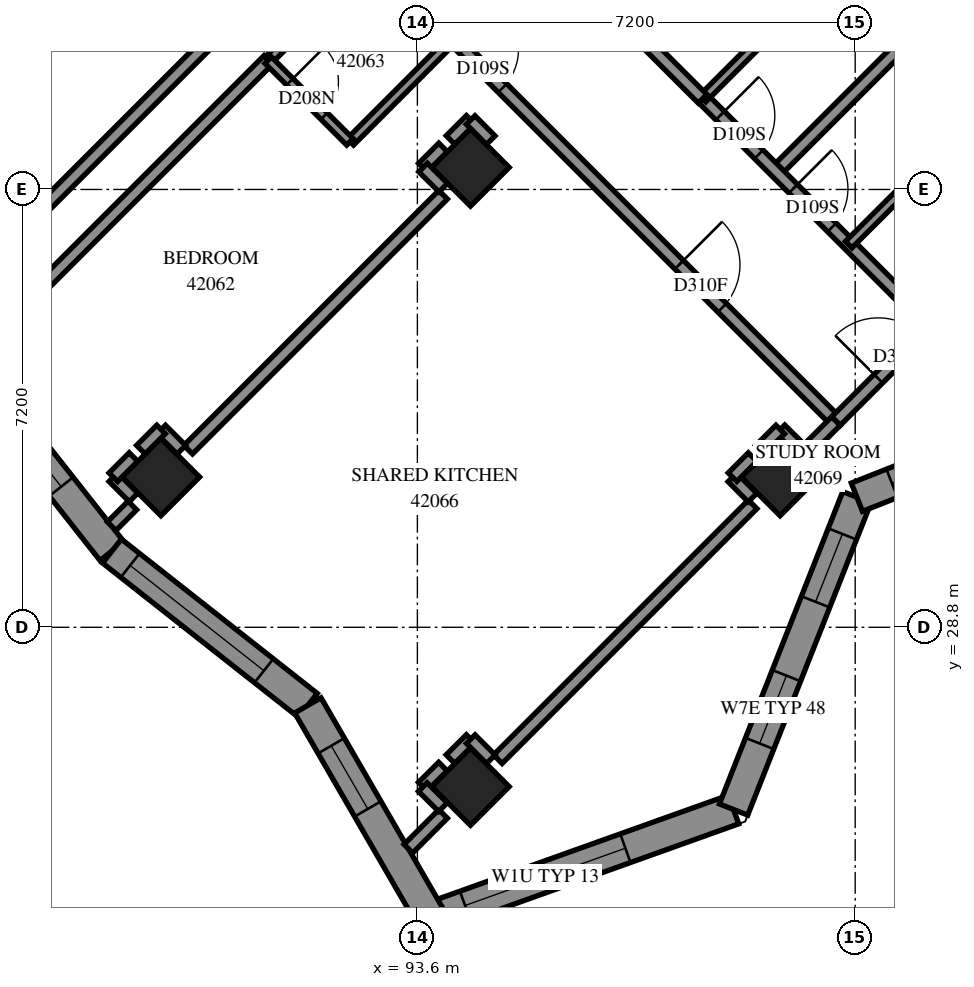
"""IFC4 building model, lengths in metres.
Left out: names, types, materials, properties, quantities, classifications, styles, units other than length and angle.
Written with IfcOpenShell. Run it as: python <this file> out.ifc"""

import sys

from ifc_helpers import new_model, si_unit, direction, frame, frame_2d, origin, origin_2d, place, context, subcontext, project, spatial, polyline, rectangle, outline, extrude, element, fill, save


model = new_model("IFC4")
c1 = context("Model", 3, precision=1e-05, world=origin(), true_north=direction((0.0, 1.0)))
c2 = subcontext(c1, "Body", "Model", "MODEL_VIEW")
j1 = project(units=[si_unit("LENGTHUNIT", "METRE"), si_unit("PLANEANGLEUNIT", "RADIAN")], contexts=[c1])
p1 = place(None, origin())
s1 = spatial("IfcSite", under=j1, at=p1, CompositionType="ELEMENT")
p2 = place(p1, origin())
s2 = spatial("IfcBuilding", under=s1, at=p2, CompositionType="ELEMENT")
p3 = place(p2, frame((0.0, 0.0, 155.8)))
s3 = spatial("IfcBuildingStorey", under=s2, at=p3, CompositionType="ELEMENT", Elevation=155.8)
for number, where, z_axis, x_axis in (
    (1, (94.474, 36.362, 0.0), (0.0, 0.0, 1.0), (0.707, -0.707, 0.0)),
    (2, (89.382, 31.271, 0.0), (0.0, 0.0, 1.0), (0.707, -0.707, 0.0)),
    (3, (99.565, 31.271, 0.0), (0.0, 0.0, 1.0), (0.707, -0.707, 0.0)),
    (4, (94.474, 26.18, 0.0), (0.0, 0.0, 1.0), (0.707, -0.707, 0.0)),
):
    element("IfcColumn", number, at=place(p3, frame(where, z_axis=z_axis, x_axis=x_axis)), inside=s3, PredefinedType="COLUMN", context=c2, shape_type="SweptSolid", body=[
        extrude(rectangle(XDim=0.9, YDim=0.9, at=origin_2d()), origin(), (0.0, 0.0, 1.0), 3.1),
    ])
p4 = place(p3, frame((93.82, 24.023, 0.0), z_axis=(0.0, 0.0, 1.0), x_axis=(0.941647752, 0.3365999274, 0.0)))
e5 = element("IfcWall", 5, at=p4, inside=s3, PredefinedType="SOLIDWALL", context=c2, shape_type="SweptSolid", body=[
    extrude(outline(polyline([(-0.208, -0.25), (5.402, -0.25), (5.175, 0.25), (0.208, 0.25), (-0.208, -0.25)])), origin(), (0.0, 0.0, 1.0), 3.1),
])
p5 = place(p4, frame((0.599, 0.0, 0.45)))
e6 = element("IfcOpeningElement", 6, at=p5, cuts=e5, PredefinedType="OPENING", context=c2, shape_type="SweptSolid", body=[
    extrude(rectangle(XDim=2.8, YDim=2.5, at=frame_2d((1.4, 1.25))), frame((0.0, 0.26, 0.0), z_axis=(0.0, -1.0, 0.0), x_axis=(1.0, 0.0, 0.0)), (0.0, 0.0, 1.0), 0.52),
])
p6 = place(p3, frame((98.8, 25.803, 0.0), z_axis=(0.0, 0.0, 1.0), x_axis=(0.3672188953, 0.930134551, 0.0)))
e7 = element("IfcWall", 7, at=p6, inside=s3, PredefinedType="SOLIDWALL", context=c2, shape_type="SweptSolid", body=[
    extrude(outline(polyline([(-0.113, -0.25), (5.414, -0.25), (5.631, 0.25), (0.113, 0.25), (-0.113, -0.25)])), origin(), (0.0, 0.0, 1.0), 3.1),
])
p7 = place(p6, frame((1.168, 0.0, 0.45)))
e8 = element("IfcOpeningElement", 8, at=p7, cuts=e7, PredefinedType="OPENING", context=c2, shape_type="SweptSolid", body=[
    extrude(rectangle(XDim=1.2, YDim=2.5, at=frame_2d((0.6, 1.25))), frame((0.0, 0.26, 0.0), z_axis=(0.0, -1.0, 0.0), x_axis=(1.0, 0.0, 0.0)), (0.0, 0.0, 1.0), 0.52),
])
p8 = place(p6, frame((3.672, 0.0, 0.45)))
e9 = element("IfcOpeningElement", 9, at=p8, cuts=e7, PredefinedType="OPENING", context=c2, shape_type="SweptSolid", body=[
    extrude(rectangle(XDim=1.2, YDim=2.5, at=frame_2d((0.6, 1.25))), frame((0.0, 0.26, 0.0), z_axis=(0.0, -1.0, 0.0), x_axis=(1.0, 0.0, 0.0)), (0.0, 0.0, 1.0), 0.52),
])
p9 = place(p3, frame((100.828, 30.939, 0.0), z_axis=(0.0, 0.0, 1.0), x_axis=(0.930134551, 0.3672188953, 0.0)))
e10 = element("IfcWall", 10, at=p9, inside=s3, PredefinedType="SOLIDWALL", context=c2, shape_type="SweptSolid", body=[
    extrude(outline(polyline([(0.108, -0.25), (5.636, -0.25), (5.409, 0.25), (-0.108, 0.25), (0.108, -0.25)])), origin(), (0.0, 0.0, 1.0), 3.1),
])
p10 = place(p9, frame((0.62, 0.0, 0.45)))
e11 = element("IfcOpeningElement", 11, at=p10, cuts=e10, PredefinedType="OPENING", context=c2, shape_type="SweptSolid", body=[
    extrude(rectangle(XDim=2.8, YDim=2.5, at=frame_2d((1.4, 1.25))), frame((0.0, 0.26, 0.0), z_axis=(0.0, -1.0, 0.0), x_axis=(1.0, 0.0, 0.0)), (0.0, 0.0, 1.0), 0.52),
])
p11 = place(p3, frame((86.051, 33.261, 0.0), z_axis=(0.0, 0.0, 1.0), x_axis=(0.6186757476, -0.7856464341, 0.0)))
e12 = element("IfcWall", 12, at=p11, inside=s3, PredefinedType="SOLIDWALL", context=c2, shape_type="SweptSolid", body=[
    extrude(outline(polyline([(0.03, -0.25), (4.112, -0.25), (4.053, 0.25), (-0.03, 0.25), (0.03, -0.25)])), origin(), (0.0, 0.0, 1.0), 3.1),
])
p12 = place(p11, frame((0.934, 0.0, 0.7)))
e13 = element("IfcOpeningElement", 13, at=p12, cuts=e12, PredefinedType="OPENING", context=c2, shape_type="SweptSolid", body=[
    extrude(rectangle(XDim=1.8, YDim=2.2, at=frame_2d((0.9, 1.1))), frame((0.0, 0.26, 0.0), z_axis=(0.0, -1.0, 0.0), x_axis=(1.0, 0.0, 0.0)), (0.0, 0.0, 1.0), 0.52),
])
p13 = place(p3, frame((88.577, 30.053, 0.0), z_axis=(0.0, 0.0, 1.0), x_axis=(0.7856392777, -0.6186848353, 0.0)))
e14 = element("IfcWall", 14, at=p13, inside=s3, PredefinedType="SOLIDWALL", context=c2, shape_type="SweptSolid", body=[
    extrude(outline(polyline([(-0.03, -0.25), (4.053, -0.25), (4.149, 0.25), (0.03, 0.25), (-0.03, -0.25)])), origin(), (0.0, 0.0, 1.0), 3.1),
])
p14 = place(p13, frame((0.381, 0.0, 0.45)))
e15 = element("IfcOpeningElement", 15, at=p14, cuts=e14, PredefinedType="OPENING", context=c2, shape_type="SweptSolid", body=[
    extrude(rectangle(XDim=2.8, YDim=2.5, at=frame_2d((1.4, 1.25))), frame((0.0, 0.26, 0.0), z_axis=(0.0, -1.0, 0.0), x_axis=(1.0, 0.0, 0.0)), (0.0, 0.0, 1.0), 0.52),
])
p15 = place(p3, frame((91.799, 27.516, 0.0), z_axis=(0.0, 0.0, 1.0), x_axis=(0.5008575119, -0.8655297527, 0.0)))
e16 = element("IfcWall", 16, at=p15, inside=s3, PredefinedType="SOLIDWALL", context=c2, shape_type="SweptSolid", body=[
    extrude(outline(polyline([(0.048, -0.25), (4.244, -0.25), (3.827, 0.25), (-0.048, 0.25), (0.048, -0.25)])), origin(), (0.0, 0.0, 1.0), 3.1),
])
p16 = place(p15, frame((0.768, 0.0, 0.45)))
e17 = element("IfcOpeningElement", 17, at=p16, cuts=e16, PredefinedType="OPENING", context=c2, shape_type="SweptSolid", body=[
    extrude(rectangle(XDim=1.2, YDim=2.5, at=frame_2d((0.6, 1.25))), frame((0.0, 0.26, 0.0), z_axis=(0.0, -1.0, 0.0), x_axis=(1.0, 0.0, 0.0)), (0.0, 0.0, 1.0), 0.52),
])
p17 = place(p3, frame((92.209, 40.459, 0.0), z_axis=(0.0, 0.0, 1.0), x_axis=(0.7071067812, -0.7071067812, 0.0)))
e18 = element("IfcWall", 18, at=p17, inside=s3, PredefinedType="PARTITIONING", context=c2, shape_type="SweptSolid", body=[
    extrude(rectangle(XDim=11.698, YDim=0.2, at=frame_2d((5.849, 0.0))), origin(), (0.0, 0.0, 1.0), 3.1),
])
p18 = place(p17, frame((3.047, 0.0, 0.0)))
e19 = element("IfcOpeningElement", 19, at=p18, cuts=e18, PredefinedType="OPENING", context=c2, shape_type="SweptSolid", body=[
    extrude(rectangle(XDim=0.9, YDim=2.1, at=frame_2d((0.45, 1.05))), frame((0.0, 0.11, 0.0), z_axis=(0.0, -1.0, 0.0), x_axis=(1.0, 0.0, 0.0)), (0.0, 0.0, 1.0), 0.22),
])
p19 = place(p17, frame((8.056, 0.0, 0.0)))
e20 = element("IfcOpeningElement", 20, at=p19, cuts=e18, PredefinedType="OPENING", context=c2, shape_type="SweptSolid", body=[
    extrude(rectangle(XDim=1.0, YDim=2.1, at=frame_2d((0.5, 1.05))), frame((0.0, 0.11, 0.0), z_axis=(0.0, -1.0, 0.0), x_axis=(1.0, 0.0, 0.0)), (0.0, 0.0, 1.0), 0.22),
])
p20 = place(p3, frame((86.837, 35.091, 0.0), z_axis=(0.0, 0.0, 1.0), x_axis=(0.7071067812, 0.7071067812, 0.0)))
e21 = element("IfcWall", 21, at=p20, inside=s3, PredefinedType="PARTITIONING", context=c2, shape_type="SweptSolid", body=[
    extrude(rectangle(XDim=7.597, YDim=0.2, at=frame_2d((3.799, 0.0))), origin(), (0.0, 0.0, 1.0), 3.1),
])
p21 = place(p20, frame((6.395, 0.0, 0.0)))
e22 = element("IfcOpeningElement", 22, at=p21, cuts=e21, PredefinedType="OPENING", context=c2, shape_type="SweptSolid", body=[
    extrude(rectangle(XDim=1.0, YDim=2.1, at=frame_2d((0.5, 1.05))), frame((0.0, 0.11, 0.0), z_axis=(0.0, -1.0, 0.0), x_axis=(1.0, 0.0, 0.0)), (0.0, 0.0, 1.0), 0.22),
])
p22 = place(p3, frame((86.33, 33.311, 0.0), z_axis=(0.0, 0.0, 1.0), x_axis=(0.7071067812, 0.7071067812, 0.0)))
e23 = element("IfcWall", 23, at=p22, inside=s3, PredefinedType="PARTITIONING", context=c2, shape_type="SweptSolid", body=[
    extrude(rectangle(XDim=6.816, YDim=0.2, at=frame_2d((3.408, 0.0))), origin(), (0.0, 0.0, 1.0), 3.1),
])
p23 = place(p3, frame((99.494, 36.292, 0.0), z_axis=(0.0, 0.0, 1.0), x_axis=(0.7071067812, 0.7071067812, 0.0)))
e24 = element("IfcWall", 24, at=p23, inside=s3, PredefinedType="PARTITIONING", context=c2, shape_type="SweptSolid", body=[
    extrude(rectangle(XDim=6.799, YDim=0.2, at=frame_2d((3.4, 0.0))), origin(), (0.0, 0.0, 1.0), 3.1),
])
p24 = place(p3, frame((89.831, 31.721, 0.0), z_axis=(0.0, 0.0, 1.0), x_axis=(0.7071067812, 0.7071067812, 0.0)))
e25 = element("IfcWall", 25, at=p24, inside=s3, PredefinedType="PARTITIONING", context=c2, shape_type="SweptSolid", body=[
    extrude(rectangle(XDim=5.928, YDim=0.2, at=frame_2d((2.964, 0.0))), origin(), (0.0, 0.0, 1.0), 3.1),
])
p25 = place(p3, frame((94.923, 26.631, 0.0), z_axis=(0.0, 0.0, 1.0), x_axis=(0.7071067812, 0.7071067812, 0.0)))
e26 = element("IfcWall", 26, at=p25, inside=s3, PredefinedType="PARTITIONING", context=c2, shape_type="SweptSolid", body=[
    extrude(rectangle(XDim=5.926, YDim=0.2, at=frame_2d((2.963, 0.0))), origin(), (0.0, 0.0, 1.0), 2.6),
])
p26 = place(p3, frame((98.295, 37.497, 0.0), z_axis=(0.0, 0.0, 1.0), x_axis=(0.7071067812, -0.7071067812, 0.0)))
e27 = element("IfcWall", 27, at=p26, inside=s3, PredefinedType="PARTITIONING", context=c2, shape_type="SweptSolid", body=[
    extrude(rectangle(XDim=5.301, YDim=0.2, at=frame_2d((2.65, 0.0))), origin(), (0.0, 0.0, 1.0), 3.1),
])
p27 = place(p26, frame((0.401, 0.0, 0.0)))
e28 = element("IfcOpeningElement", 28, at=p27, cuts=e27, PredefinedType="OPENING", context=c2, shape_type="SweptSolid", body=[
    extrude(rectangle(XDim=0.9, YDim=2.1, at=frame_2d((0.45, 1.05))), frame((0.0, 0.11, 0.0), z_axis=(0.0, -1.0, 0.0), x_axis=(1.0, 0.0, 0.0)), (0.0, 0.0, 1.0), 0.22),
])
p28 = place(p26, frame((2.1, 0.0, 0.0)))
e29 = element("IfcOpeningElement", 29, at=p28, cuts=e27, PredefinedType="OPENING", context=c2, shape_type="SweptSolid", body=[
    extrude(rectangle(XDim=0.9, YDim=2.1, at=frame_2d((0.45, 1.05))), frame((0.0, 0.11, 0.0), z_axis=(0.0, -1.0, 0.0), x_axis=(1.0, 0.0, 0.0)), (0.0, 0.0, 1.0), 0.22),
])
for number, where, z_axis, x_axis in (
    (30, (100.693, 35.093, 0.0), (0.0, 0.0, 1.0), (0.708, 0.707, 0.0)),
    (31, (91.152, 38.128, 0.0), (0.0, 0.0, 1.0), (0.708, 0.707, 0.0)),
    (32, (92.497, 36.783, 0.0), (0.0, 0.0, 1.0), (0.707, 0.708, 0.0)),
):
    element("IfcWall", number, at=place(p3, frame(where, z_axis=z_axis, x_axis=x_axis)), inside=s3, PredefinedType="PARTITIONING", context=c2, shape_type="SweptSolid", body=[
        extrude(rectangle(XDim=2.4, YDim=0.15, at=frame_2d((1.2, 0.0))), origin(), (0.0, 0.0, 1.0), 3.1),
    ])
p29 = place(p3, frame((98.291, 37.495, 0.0), z_axis=(0.0, 0.0, 1.0), x_axis=(0.7071067812, 0.7071067812, 0.0)))
e33 = element("IfcWall", 33, at=p29, inside=s3, PredefinedType="PARTITIONING", context=c2, shape_type="SweptSolid", body=[
    extrude(rectangle(XDim=2.398, YDim=0.15, at=frame_2d((1.199, 0.0))), origin(), (0.0, 0.0, 1.0), 3.1),
])
p30 = place(p3, frame((100.483, 32.191, 0.0), z_axis=(0.0, 0.0, 1.0), x_axis=(0.7071067812, 0.7071067812, 0.0)))
e34 = element("IfcWall", 34, at=p30, inside=s3, PredefinedType="PARTITIONING", context=c2, shape_type="SweptSolid", body=[
    extrude(rectangle(XDim=2.198, YDim=0.2, at=frame_2d((1.099, 0.0))), origin(), (0.0, 0.0, 1.0), 2.6),
])
p31 = place(p30, frame((0.987, 0.0, 0.0)))
e35 = element("IfcOpeningElement", 35, at=p31, cuts=e34, PredefinedType="OPENING", context=c2, shape_type="SweptSolid", body=[
    extrude(rectangle(XDim=1.0, YDim=2.1, at=frame_2d((0.5, 1.05))), frame((0.0, 0.11, 0.0), z_axis=(0.0, -1.0, 0.0), x_axis=(1.0, 0.0, 0.0)), (0.0, 0.0, 1.0), 0.22),
])
p32 = place(p3, frame((91.147, 38.127, 0.0), z_axis=(0.0, 0.0, 1.0), x_axis=(0.7071067812, -0.7071067812, 0.0)))
e36 = element("IfcWall", 36, at=p32, inside=s3, PredefinedType="PARTITIONING", context=c2, shape_type="SweptSolid", body=[
    extrude(rectangle(XDim=1.901, YDim=0.15, at=frame_2d((0.95, 0.0))), origin(), (0.0, 0.0, 1.0), 3.1),
])
p33 = place(p32, frame((0.502, 0.0, 0.0)))
e37 = element("IfcOpeningElement", 37, at=p33, cuts=e36, PredefinedType="OPENING", context=c2, shape_type="SweptSolid", body=[
    extrude(rectangle(XDim=0.8, YDim=2.1, at=frame_2d((0.4, 1.05))), frame((0.0, 0.085, 0.0), z_axis=(0.0, -1.0, 0.0), x_axis=(1.0, 0.0, 0.0)), (0.0, 0.0, 1.0), 0.17),
])
p34 = place(p3, frame((96.946, 38.834, 0.0), z_axis=(0.0, 0.0, 1.0), x_axis=(0.7076330979, -0.7065800724, 0.0)))
e38 = element("IfcWall", 38, at=p34, inside=s3, PredefinedType="PARTITIONING", context=c2, shape_type="SweptSolid", body=[
    extrude(rectangle(XDim=1.899, YDim=0.2, at=frame_2d((0.95, 0.0))), origin(), (0.0, 0.0, 1.0), 3.1),
])
p35 = place(p3, frame((93.452, 25.159, 0.0), z_axis=(0.0, 0.0, 1.0), x_axis=(0.7071067812, 0.7071067812, 0.0)))
e39 = element("IfcWall", 39, at=p35, inside=s3, PredefinedType="PARTITIONING", context=c2, shape_type="SweptSolid", body=[
    extrude(rectangle(XDim=0.808, YDim=0.2, at=frame_2d((0.404, 0.0))), origin(), (0.0, 0.0, 1.0), 3.1),
])
p36 = place(p3, frame((100.013, 31.721, 0.0), z_axis=(0.0, 0.0, 1.0), x_axis=(0.7071067812, 0.7071067812, 0.0)))
e40 = element("IfcWall", 40, at=p36, inside=s3, PredefinedType="PARTITIONING", context=c2, shape_type="SweptSolid", body=[
    extrude(rectangle(XDim=0.665, YDim=0.2, at=frame_2d((0.332, 0.0))), origin(), (0.0, 0.0, 1.0), 2.6),
])
p37 = place(p3, frame((99.571, 32.055, 0.0), z_axis=(0.0, 0.0, 1.0), x_axis=(0.7092270271, -0.7049801586, 0.0)))
e41 = element("IfcWall", 41, at=p37, inside=s3, PredefinedType="PARTITIONING", context=c2, shape_type="SweptSolid", body=[
    extrude(rectangle(XDim=0.471, YDim=0.2, at=frame_2d((0.235, 0.0))), origin(), (0.0, 0.0, 1.0), 3.1),
])
for number, where, z_axis, x_axis in (
    (42, (94.145, 36.813, 0.0), (0.0, 0.0, 1.0), (0.707, 0.707, 0.0)),
    (43, (88.6, 31.268, 0.0), (0.0, 0.0, 1.0), (0.707, -0.707, 0.0)),
    (44, (99.235, 31.721, 0.0), (0.0, 0.0, 1.0), (0.707, 0.707, 0.0)),
    (45, (89.386, 32.052, 0.0), (0.0, 0.0, 1.0), (0.707, -0.707, 0.0)),
    (46, (88.6, 31.268, 0.0), (0.0, 0.0, 1.0), (0.707, 0.707, 0.0)),
    (47, (89.053, 31.721, 0.0), (0.0, 0.0, 1.0), (0.707, 0.707, 0.0)),
    (48, (93.691, 36.359, 0.0), (0.0, 0.0, 1.0), (0.707, 0.707, 0.0)),
):
    element("IfcWall", number, at=place(p3, frame(where, z_axis=z_axis, x_axis=x_axis)), inside=s3, PredefinedType="PARTITIONING", context=c2, shape_type="SweptSolid", body=[
        extrude(rectangle(XDim=0.469, YDim=0.2, at=frame_2d((0.235, 0.0))), origin(), (0.0, 0.0, 1.0), 3.1),
    ])
for number, where, z_axis, x_axis in (
    (49, (94.476, 37.142, 0.0), (0.0, 0.0, 1.0), (0.705, -0.709, 0.0)),
    (50, (93.689, 26.179, 0.0), (0.0, 0.0, 1.0), (0.709, 0.705, 0.0)),
    (51, (93.689, 26.173, 0.0), (0.0, 0.0, 1.0), (0.709, -0.705, 0.0)),
    (52, (93.695, 36.361, 0.0), (0.0, 0.0, 1.0), (0.709, -0.705, 0.0)),
    (53, (94.144, 26.632, 0.0), (0.0, 0.0, 1.0), (0.709, 0.705, 0.0)),
    (54, (98.781, 31.265, 0.0), (0.0, 0.0, 1.0), (0.705, -0.709, 0.0)),
):
    element("IfcWall", number, at=place(p3, frame(where, z_axis=z_axis, x_axis=x_axis)), inside=s3, PredefinedType="PARTITIONING", context=c2, shape_type="SweptSolid", body=[
        extrude(rectangle(XDim=0.468, YDim=0.2, at=frame_2d((0.234, 0.0))), origin(), (0.0, 0.0, 1.0), 3.1),
    ])
for number, where, z_axis, x_axis in (
    (55, (94.478, 26.96, 0.0), (0.0, 0.0, 1.0), (0.707, -0.707, 0.0)),
    (56, (98.783, 31.269, 0.0), (0.0, 0.0, 1.0), (0.707, 0.707, 0.0)),
):
    element("IfcWall", number, at=place(p3, frame(where, z_axis=z_axis, x_axis=x_axis)), inside=s3, PredefinedType="PARTITIONING", context=c2, shape_type="SweptSolid", body=[
        extrude(rectangle(XDim=0.467, YDim=0.2, at=frame_2d((0.233, 0.0))), origin(), (0.0, 0.0, 1.0), 3.1),
    ])
p38 = place(p3, frame((88.573, 30.463, 0.0), z_axis=(0.0, 0.0, 1.0), x_axis=(0.7071067812, 0.7071067812, 0.0)))
e57 = element("IfcWall", 57, at=p38, inside=s3, PredefinedType="PARTITIONING", context=c2, shape_type="SweptSolid", body=[
    extrude(rectangle(XDim=0.481, YDim=0.2, at=frame_2d((0.241, 0.0))), origin(), (0.0, 0.0, 1.0), 3.1),
])
p39 = place(p5, origin())
e58 = element("IfcWindow", 58, at=p39, inside=s3, PartitioningType="SINGLE_PANEL", PredefinedType="WINDOW", context=c2, shape_type="SweptSolid", body=[
    extrude(rectangle(XDim=2.8, YDim=2.5, at=frame_2d((1.4, 1.25))), frame((0.0, 0.18, 0.0), z_axis=(0.0, -1.0, 0.0), x_axis=(1.0, 0.0, 0.0)), (0.0, 0.0, 1.0), 0.06),
])
fill(e6, e58)
p40 = place(p7, origin())
e59 = element("IfcWindow", 59, at=p40, inside=s3, PartitioningType="SINGLE_PANEL", PredefinedType="WINDOW", context=c2, shape_type="SweptSolid", body=[
    extrude(rectangle(XDim=1.2, YDim=2.5, at=frame_2d((0.6, 1.25))), frame((0.0, 0.18, 0.0), z_axis=(0.0, -1.0, 0.0), x_axis=(1.0, 0.0, 0.0)), (0.0, 0.0, 1.0), 0.06),
])
fill(e8, e59)
p41 = place(p8, origin())
e60 = element("IfcWindow", 60, at=p41, inside=s3, PartitioningType="SINGLE_PANEL", PredefinedType="WINDOW", context=c2, shape_type="SweptSolid", body=[
    extrude(rectangle(XDim=1.2, YDim=2.5, at=frame_2d((0.6, 1.25))), frame((0.0, 0.18, 0.0), z_axis=(0.0, -1.0, 0.0), x_axis=(1.0, 0.0, 0.0)), (0.0, 0.0, 1.0), 0.06),
])
fill(e9, e60)
p42 = place(p10, origin())
e61 = element("IfcWindow", 61, at=p42, inside=s3, PartitioningType="SINGLE_PANEL", PredefinedType="WINDOW", context=c2, shape_type="SweptSolid", body=[
    extrude(rectangle(XDim=2.8, YDim=2.5, at=frame_2d((1.4, 1.25))), frame((0.0, 0.18, 0.0), z_axis=(0.0, -1.0, 0.0), x_axis=(1.0, 0.0, 0.0)), (0.0, 0.0, 1.0), 0.06),
])
fill(e11, e61)
p43 = place(p14, origin())
e62 = element("IfcWindow", 62, at=p43, inside=s3, PartitioningType="SINGLE_PANEL", PredefinedType="WINDOW", context=c2, shape_type="SweptSolid", body=[
    extrude(rectangle(XDim=2.8, YDim=2.5, at=frame_2d((1.4, 1.25))), frame((0.0, 0.18, 0.0), z_axis=(0.0, -1.0, 0.0), x_axis=(1.0, 0.0, 0.0)), (0.0, 0.0, 1.0), 0.06),
])
fill(e15, e62)
p44 = place(p16, origin())
e63 = element("IfcWindow", 63, at=p44, inside=s3, PartitioningType="SINGLE_PANEL", PredefinedType="WINDOW", context=c2, shape_type="SweptSolid", body=[
    extrude(rectangle(XDim=1.2, YDim=2.5, at=frame_2d((0.6, 1.25))), frame((0.0, 0.18, 0.0), z_axis=(0.0, -1.0, 0.0), x_axis=(1.0, 0.0, 0.0)), (0.0, 0.0, 1.0), 0.06),
])
fill(e17, e63)
p45 = place(p18, origin())
e64 = element("IfcDoor", 64, at=p45, inside=s3, OperationType="SINGLE_SWING_LEFT", PredefinedType="DOOR", context=c2, shape_type="SweptSolid", body=[
    extrude(rectangle(XDim=0.9, YDim=2.1, at=frame_2d((0.45, 1.05))), frame((0.0, 0.025, 0.0), z_axis=(0.0, -1.0, 0.0), x_axis=(1.0, 0.0, 0.0)), (0.0, 0.0, 1.0), 0.05),
])
fill(e19, e64)
p46 = place(p33, origin())
e65 = element("IfcDoor", 65, at=p46, inside=s3, OperationType="SINGLE_SWING_RIGHT", PredefinedType="DOOR", context=c2, shape_type="SweptSolid", body=[
    extrude(rectangle(XDim=0.8, YDim=2.1, at=frame_2d((0.4, 1.05))), frame((0.0, 0.025, 0.0), z_axis=(0.0, -1.0, 0.0), x_axis=(1.0, 0.0, 0.0)), (0.0, 0.0, 1.0), 0.05),
])
fill(e37, e65)
p47 = place(p27, origin())
e66 = element("IfcDoor", 66, at=p47, inside=s3, OperationType="SINGLE_SWING_LEFT", PredefinedType="DOOR", context=c2, shape_type="SweptSolid", body=[
    extrude(rectangle(XDim=0.9, YDim=2.1, at=frame_2d((0.45, 1.05))), frame((0.0, 0.025, 0.0), z_axis=(0.0, -1.0, 0.0), x_axis=(1.0, 0.0, 0.0)), (0.0, 0.0, 1.0), 0.05),
])
fill(e28, e66)
p48 = place(p19, origin())
e67 = element("IfcDoor", 67, at=p48, inside=s3, OperationType="SINGLE_SWING_RIGHT", PredefinedType="DOOR", context=c2, shape_type="SweptSolid", body=[
    extrude(rectangle(XDim=1.0, YDim=2.1, at=frame_2d((0.5, 1.05))), frame((0.0, 0.025, 0.0), z_axis=(0.0, -1.0, 0.0), x_axis=(1.0, 0.0, 0.0)), (0.0, 0.0, 1.0), 0.05),
])
fill(e20, e67)
p49 = place(p28, origin())
e68 = element("IfcDoor", 68, at=p49, inside=s3, OperationType="SINGLE_SWING_RIGHT", PredefinedType="DOOR", context=c2, shape_type="SweptSolid", body=[
    extrude(rectangle(XDim=0.9, YDim=2.1, at=frame_2d((0.45, 1.05))), frame((0.0, 0.025, 0.0), z_axis=(0.0, -1.0, 0.0), x_axis=(1.0, 0.0, 0.0)), (0.0, 0.0, 1.0), 0.05),
])
fill(e29, e68)
p50 = place(p31, origin())
e69 = element("IfcDoor", 69, at=p50, inside=s3, OperationType="SINGLE_SWING_RIGHT", PredefinedType="DOOR", context=c2, shape_type="SweptSolid", body=[
    extrude(rectangle(XDim=1.0, YDim=2.1, at=frame_2d((0.5, 1.05))), frame((0.0, 0.025, 0.0), z_axis=(0.0, -1.0, 0.0), x_axis=(1.0, 0.0, 0.0)), (0.0, 0.0, 1.0), 0.05),
])
fill(e35, e69)
p51 = place(p12, origin())
e70 = element("IfcWindow", 70, at=p51, inside=s3, PartitioningType="SINGLE_PANEL", PredefinedType="WINDOW", context=c2, shape_type="SweptSolid", body=[
    extrude(rectangle(XDim=1.8, YDim=2.2, at=frame_2d((0.9, 1.1))), frame((0.0, 0.18, 0.0), z_axis=(0.0, -1.0, 0.0), x_axis=(1.0, 0.0, 0.0)), (0.0, 0.0, 1.0), 0.06),
])
fill(e13, e70)
save(model, sys.argv[1])
